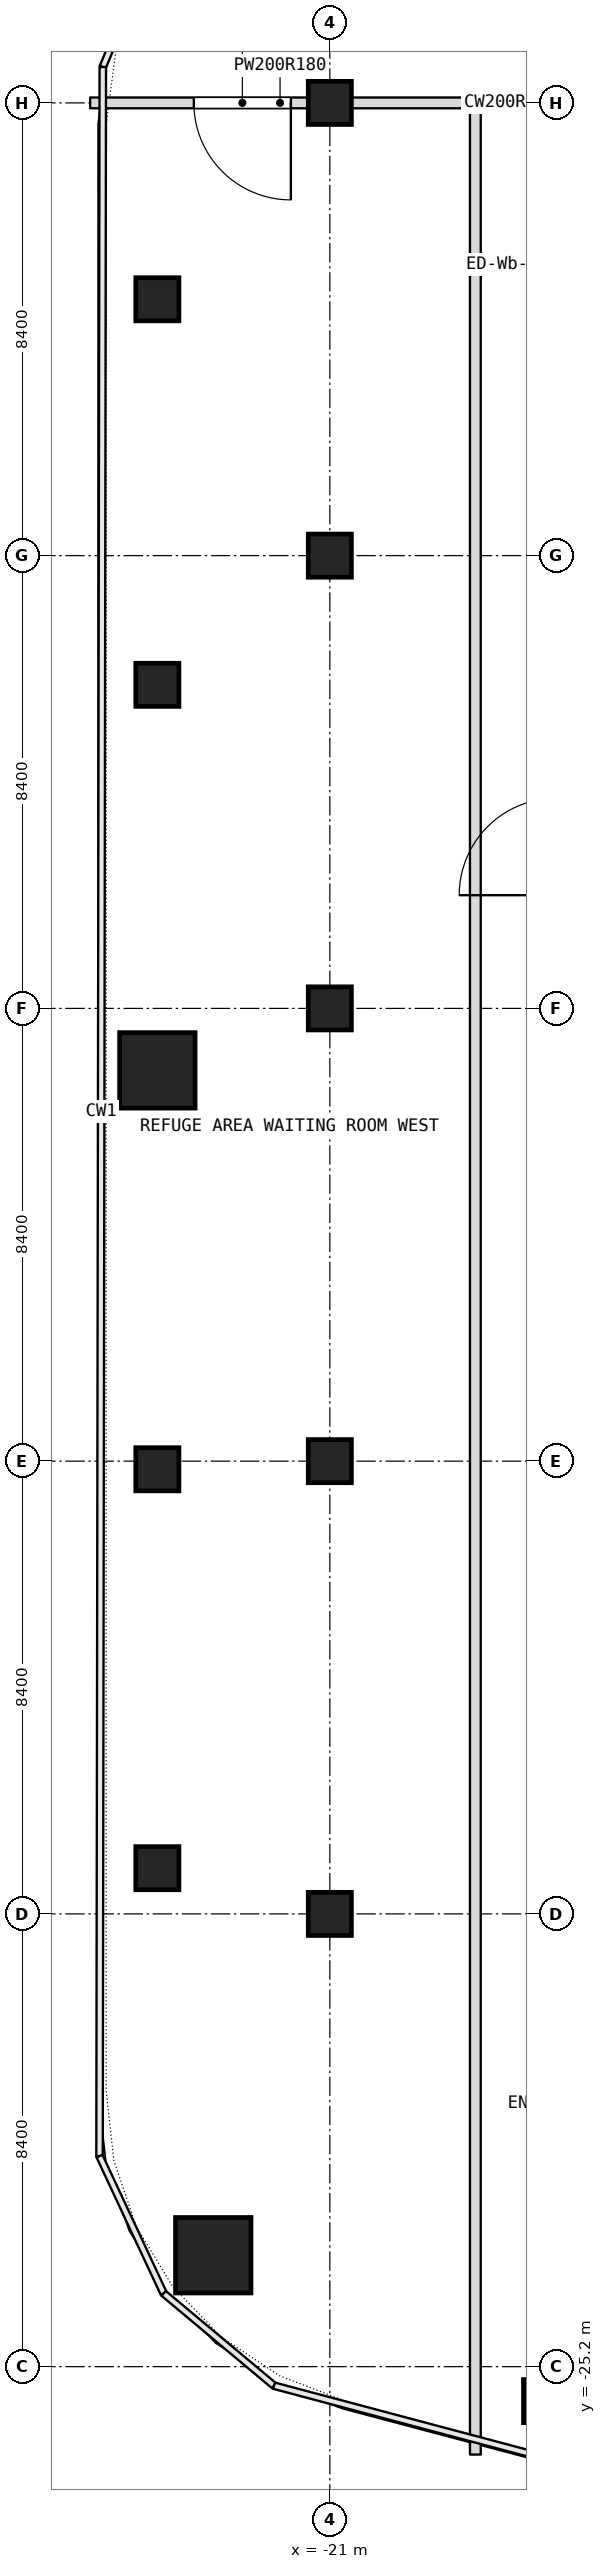
"""IFC4 building model, lengths in metres.
Left out: names, types, materials, properties, quantities, classifications, styles, units other than length and angle.
Written with IfcOpenShell. Run it as: python <this file> out.ifc"""

import sys

from ifc_helpers import new_model, si_unit, direction, frame, frame_2d, origin, origin_2d, place, context, subcontext, project, spatial, rectangle, extrude, element, fill, save


model = new_model("IFC4")
c1 = context("Model", 3, precision=1e-05, world=origin(), true_north=direction((0.0, 1.0)))
c2 = subcontext(c1, "Body", "Model", "MODEL_VIEW")
j1 = project(units=[si_unit("LENGTHUNIT", "METRE"), si_unit("PLANEANGLEUNIT", "RADIAN")], contexts=[c1])
p1 = place(None, origin())
s1 = spatial("IfcSite", under=j1, at=p1, CompositionType="ELEMENT")
p2 = place(p1, origin())
s2 = spatial("IfcBuilding", under=s1, at=p2, CompositionType="ELEMENT")
p3 = place(p2, frame((0.0, 0.0, 216.5)))
s3 = spatial("IfcBuildingStorey", under=s2, at=p3, CompositionType="ELEMENT", Elevation=216.5)
for number, where, z_axis, x_axis in (
    (1, (-23.163, -23.133, 0.0), (0.0, 0.0, 1.0), (1.0, 0.0, 0.0)),
    (2, (-24.2, -1.15, 0.0), (0.0, 0.0, 1.0), (1.0, 0.0, 0.0)),
):
    element("IfcColumn", number, at=place(p3, frame(where, z_axis=z_axis, x_axis=x_axis)), inside=s3, PredefinedType="COLUMN", context=c2, shape_type="SweptSolid", body=[
        extrude(rectangle(XDim=1.4, YDim=1.4, at=origin_2d()), origin(), (0.0, 0.0, 1.0), 3.6),
    ])
for number, where, z_axis, x_axis in (
    (3, (-21.0, -16.8, 0.0), (0.0, 0.0, 1.0), (1.0, 0.0, 0.0)),
    (4, (-21.0, -8.4, 0.0), (0.0, 0.0, 1.0), (1.0, 0.0, 0.0)),
    (5, (-21.0, 0.0, 0.0), (0.0, 0.0, 1.0), (1.0, 0.0, 0.0)),
    (6, (-21.0, 8.4, 0.0), (0.0, 0.0, 1.0), (1.0, 0.0, 0.0)),
    (7, (-21.0, 16.8, 0.0), (0.0, 0.0, 1.0), (1.0, 0.0, 0.0)),
    (8, (-24.2, -15.952, 0.0), (0.0, 0.0, 1.0), (1.0, 0.0, 0.0)),
    (9, (-24.2, -8.551, 0.0), (0.0, 0.0, 1.0), (1.0, 0.0, 0.0)),
    (10, (-24.2, 6.003, 0.0), (0.0, 0.0, 1.0), (1.0, 0.0, 0.0)),
    (11, (-24.2, 13.156, 0.0), (0.0, 0.0, 1.0), (1.0, 0.0, 0.0)),
    (12, (-17.007, -25.839, 0.0), (0.0, 0.0, 1.0), (1.0, 0.0, 0.0)),
):
    element("IfcColumn", number, at=place(p3, frame(where, z_axis=z_axis, x_axis=x_axis)), inside=s3, PredefinedType="COLUMN", context=c2, shape_type="SweptSolid", body=[
        extrude(rectangle(XDim=0.8, YDim=0.8, at=origin_2d()), origin(), (0.0, 0.0, 1.0), 3.6),
    ])
p4 = place(p3, frame((-25.447, 16.8, 0.0), z_axis=(0.0, 0.0, 1.0), x_axis=(1.0, 0.0, 0.0)))
e13 = element("IfcWall", 13, at=p4, inside=s3, PredefinedType="PARTITIONING", context=c2, shape_type="SweptSolid", body=[
    extrude(rectangle(XDim=7.047, YDim=0.2, at=frame_2d((3.523, 0.0))), origin(), (0.0, 0.0, 1.0), 2.94),
])
p5 = place(p4, frame((1.924, 0.0, 0.0)))
e14 = element("IfcOpeningElement", 14, at=p5, cuts=e13, PredefinedType="OPENING", context=c2, shape_type="SweptSolid", body=[
    extrude(rectangle(XDim=1.8, YDim=2.1, at=frame_2d((0.9, 1.05))), frame((0.0, 0.1, 0.0), z_axis=(0.0, -1.0, 0.0), x_axis=(1.0, 0.0, 0.0)), (0.0, 0.0, 1.0), 0.2),
])
p6 = place(p3, frame((-18.4, 16.8, 0.0), z_axis=(0.0, 0.0, 1.0), x_axis=(1.0, 0.0, 0.0)))
e15 = element("IfcWall", 15, at=p6, inside=s3, PredefinedType="PARTITIONING", context=c2, shape_type="SweptSolid", body=[
    extrude(rectangle(XDim=1.5, YDim=0.2, at=frame_2d((0.75, 0.0))), origin(), (0.0, 0.0, 1.0), 2.94),
])
p7 = place(p3, frame((-18.3, -26.831, 0.0), z_axis=(0.0, 0.0, 1.0), x_axis=(0.0, 1.0, 0.0)))
e16 = element("IfcWall", 16, at=p7, inside=s3, PredefinedType="PARTITIONING", context=c2, shape_type="SweptSolid", body=[
    extrude(rectangle(XDim=43.531, YDim=0.2, at=frame_2d((21.766, 0.0))), origin(), (0.0, 0.0, 1.0), 3.34),
])
p8 = place(p5, origin())
e17 = element("IfcDoor", 17, at=p8, inside=s3, OperationType="DOUBLE_DOOR_SINGLE_SWING", PredefinedType="DOOR", context=c2, shape_type="SweptSolid", body=[
    extrude(rectangle(XDim=1.8, YDim=2.1, at=frame_2d((0.9, 1.05))), frame((0.0, 0.025, 0.0), z_axis=(0.0, -1.0, 0.0), x_axis=(1.0, 0.0, 0.0)), (0.0, 0.0, 1.0), 0.05),
])
fill(e14, e17)
save(model, sys.argv[1])
